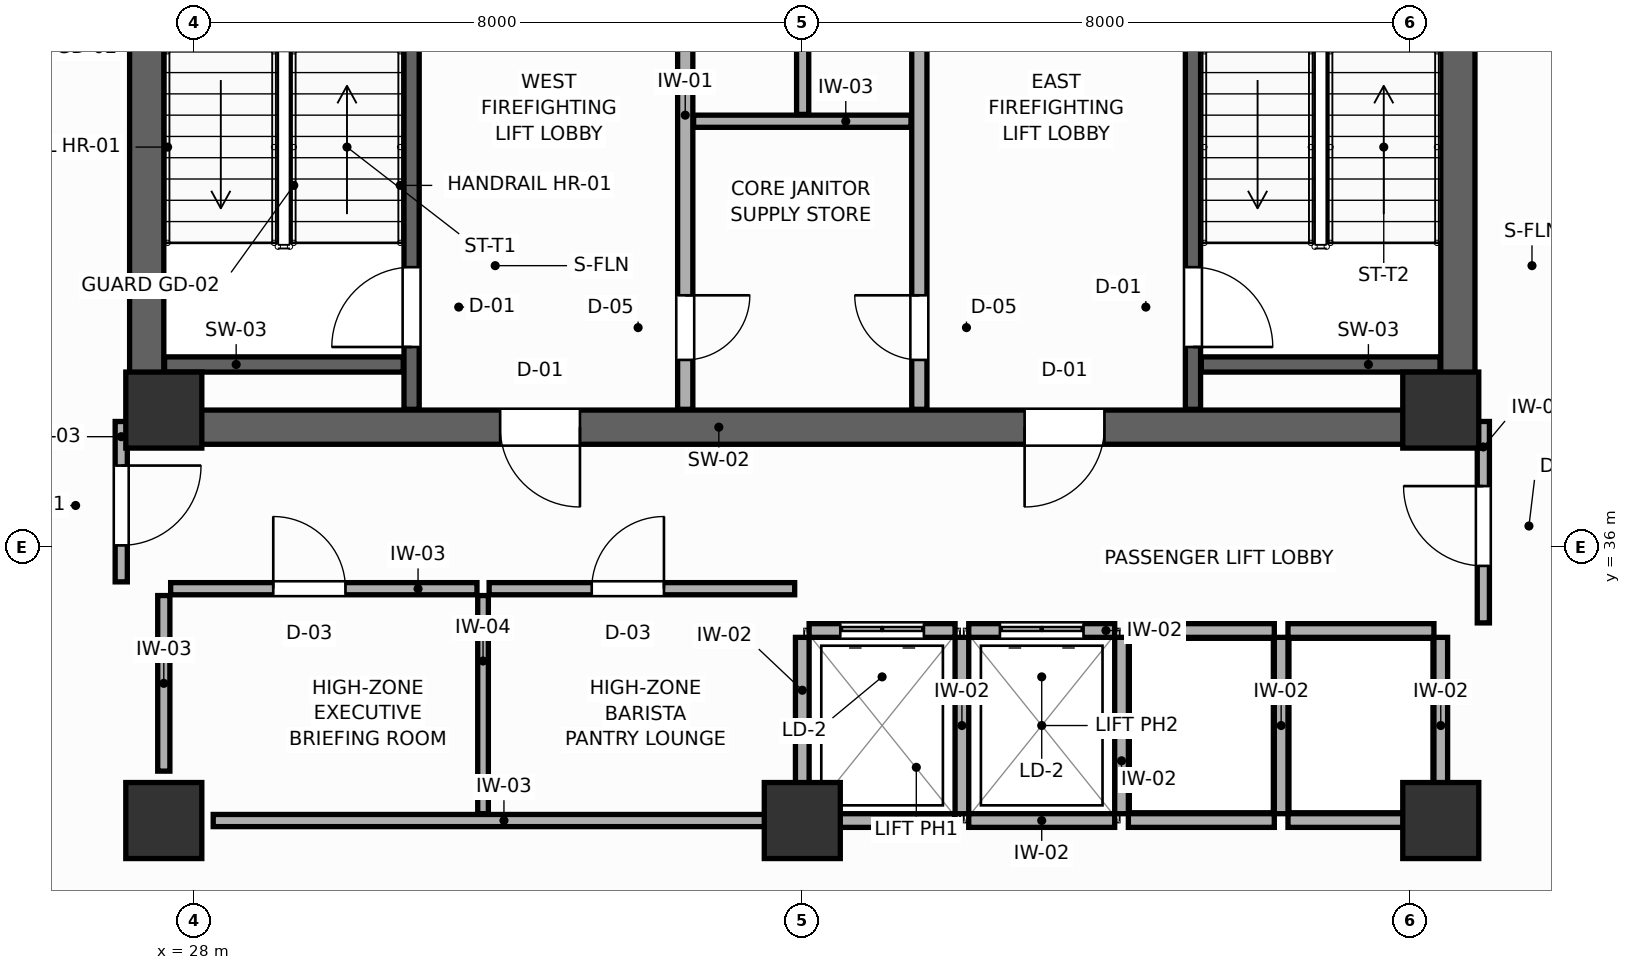
"""IFC4 building model, lengths in metres.
Left out: names, types, materials, properties, quantities, classifications, styles, units other than length and angle.
Written with IfcOpenShell. Run it as: python <this file> out.ifc"""

import sys

from ifc_helpers import new_model, si_unit, direction, frame, frame_2d, origin, origin_2d, place, context, subcontext, project, spatial, rectangle, extrude, source, transform, mapped, element, fill, save


model = new_model("IFC4")
c1 = context("Model", 3, precision=1e-05, world=origin(), true_north=direction((0.0, 1.0)))
c2 = subcontext(c1, "Body", "Model", "MODEL_VIEW")
j1 = project(units=[si_unit("LENGTHUNIT", "METRE"), si_unit("PLANEANGLEUNIT", "RADIAN")], contexts=[c1])
p1 = place(None, origin())
s1 = spatial("IfcSite", under=j1, at=p1, CompositionType="ELEMENT")
p2 = place(p1, origin())
s2 = spatial("IfcBuilding", under=s1, at=p2, CompositionType="ELEMENT")
p3 = place(p2, frame((0.0, 0.0, 193.8)))
s3 = spatial("IfcBuildingStorey", under=s2, at=p3, CompositionType="ELEMENT", Elevation=193.8)
p4 = place(p3, frame((27.15, 37.575, 0.0), z_axis=(0.0, 0.0, 1.0), x_axis=(1.0, 0.0, 0.0)))
e1 = element("IfcWall", 1, at=p4, inside=s3, PredefinedType="SHEAR", context=c2, shape_type="SweptSolid", body=[
    extrude(rectangle(XDim=17.7, YDim=0.45, at=frame_2d((8.85, 0.0))), origin(), (0.0, 0.0, 1.0), 3.6),
])
p5 = place(p4, frame((4.875, 0.0, 0.0)))
e2 = element("IfcOpeningElement", 2, at=p5, cuts=e1, PredefinedType="OPENING", context=c2, shape_type="SweptSolid", body=[
    extrude(rectangle(XDim=1.05, YDim=2.1, at=frame_2d((0.525, 1.05))), frame((0.0, 0.235, 0.0), z_axis=(0.0, -1.0, 0.0), x_axis=(1.0, 0.0, 0.0)), (0.0, 0.0, 1.0), 0.47),
])
p6 = place(p4, frame((11.775, 0.0, 0.0)))
e3 = element("IfcOpeningElement", 3, at=p6, cuts=e1, PredefinedType="OPENING", context=c2, shape_type="SweptSolid", body=[
    extrude(rectangle(XDim=1.05, YDim=2.1, at=frame_2d((0.525, 1.05))), frame((0.0, 0.235, 0.0), z_axis=(0.0, -1.0, 0.0), x_axis=(1.0, 0.0, 0.0)), (0.0, 0.0, 1.0), 0.47),
])
for number, where, z_axis, x_axis in (
    (4, (27.375, 37.8, 0.0), (0.0, 0.0, 1.0), (0.0, 1.0, 0.0)),
    (5, (44.625, 37.8, 0.0), (0.0, 0.0, 1.0), (0.0, 1.0, 0.0)),
):
    element("IfcWall", number, at=place(p3, frame(where, z_axis=z_axis, x_axis=x_axis)), inside=s3, PredefinedType="SHEAR", context=c2, shape_type="SweptSolid", body=[
        extrude(rectangle(XDim=9.0, YDim=0.45, at=frame_2d((4.5, 0.0))), origin(), (0.0, 0.0, 1.0), 3.6),
    ])
m1 = source(origin(), c2, "Body", "SweptSolid", [
    extrude(rectangle(XDim=1.0, YDim=1.0, at=origin_2d()), origin(), (0.0, 0.0, 1.0), 3.6),
])
for number, where, z_axis, x_axis in (
    (6, (27.6, 37.8, 0.0), (0.0, 0.0, 1.0), (1.0, 0.0, 0.0)),
    (7, (44.4, 37.8, 0.0), (0.0, 0.0, 1.0), (1.0, 0.0, 0.0)),
    (8, (27.6, 32.4, 0.0), (0.0, 0.0, 1.0), (1.0, 0.0, 0.0)),
    (9, (44.4, 32.4, 0.0), (0.0, 0.0, 1.0), (1.0, 0.0, 0.0)),
    (10, (36.0, 32.4, 0.0), (0.0, 0.0, 1.0), (1.0, 0.0, 0.0)),
):
    element("IfcColumn", number, at=place(p3, frame(where, z_axis=z_axis, x_axis=x_axis)), inside=s3, PredefinedType="COLUMN", context=c2, shape_type="MappedRepresentation", body=[
        mapped(m1, transform((0.0, 0.0, 0.0), scale=1.0)),
    ])
p7 = place(p3, frame((30.86, 37.81, 0.0), z_axis=(0.0, 0.0, 1.0), x_axis=(0.0, 1.0, 0.0)))
e11 = element("IfcWall", 11, at=p7, inside=s3, PredefinedType="SHEAR", context=c2, shape_type="SweptSolid", body=[
    extrude(rectangle(XDim=8.98, YDim=0.2, at=frame_2d((4.49, 0.0))), origin(), (0.0, 0.0, 1.0), 3.6),
])
p8 = place(p7, frame((0.82, 0.0, 0.0)))
e12 = element("IfcOpeningElement", 12, at=p8, cuts=e11, PredefinedType="OPENING", context=c2, shape_type="SweptSolid", body=[
    extrude(rectangle(XDim=1.05, YDim=2.1, at=frame_2d((0.525, 1.05))), frame((0.0, 0.11, 0.0), z_axis=(0.0, -1.0, 0.0), x_axis=(1.0, 0.0, 0.0)), (0.0, 0.0, 1.0), 0.22),
])
p9 = place(p3, frame((27.61, 38.4, 0.0), z_axis=(0.0, 0.0, 1.0), x_axis=(1.0, 0.0, 0.0)))
e13 = element("IfcWall", 13, at=p9, inside=s3, PredefinedType="SHEAR", context=c2, shape_type="SweptSolid", body=[
    extrude(rectangle(XDim=3.14, YDim=0.2, at=frame_2d((1.57, 0.0))), origin(), (0.0, 0.0, 1.0), 3.6),
])
p10 = place(p3, frame((41.14, 37.81, 0.0), z_axis=(0.0, 0.0, 1.0), x_axis=(0.0, 1.0, 0.0)))
e14 = element("IfcWall", 14, at=p10, inside=s3, PredefinedType="SHEAR", context=c2, shape_type="SweptSolid", body=[
    extrude(rectangle(XDim=8.98, YDim=0.2, at=frame_2d((4.49, 0.0))), origin(), (0.0, 0.0, 1.0), 3.6),
])
p11 = place(p10, frame((0.82, 0.0, 0.0)))
e15 = element("IfcOpeningElement", 15, at=p11, cuts=e14, PredefinedType="OPENING", context=c2, shape_type="SweptSolid", body=[
    extrude(rectangle(XDim=1.05, YDim=2.1, at=frame_2d((0.525, 1.05))), frame((0.0, 0.11, 0.0), z_axis=(0.0, -1.0, 0.0), x_axis=(1.0, 0.0, 0.0)), (0.0, 0.0, 1.0), 0.22),
])
p12 = place(p3, frame((41.25, 38.4, 0.0), z_axis=(0.0, 0.0, 1.0), x_axis=(1.0, 0.0, 0.0)))
e16 = element("IfcWall", 16, at=p12, inside=s3, PredefinedType="SHEAR", context=c2, shape_type="SweptSolid", body=[
    extrude(rectangle(XDim=3.14, YDim=0.2, at=frame_2d((1.57, 0.0))), origin(), (0.0, 0.0, 1.0), 3.6),
])
p13 = place(p3, frame((34.46, 37.81, 0.0), z_axis=(0.0, 0.0, 1.0), x_axis=(0.0, 1.0, 0.0)))
e17 = element("IfcWall", 17, at=p13, inside=s3, PredefinedType="PARTITIONING", context=c2, shape_type="SweptSolid", body=[
    extrude(rectangle(XDim=8.98, YDim=0.2, at=frame_2d((4.49, 0.0))), origin(), (0.0, 0.0, 1.0), 3.4),
])
p14 = place(p13, frame((0.65, 0.0, 0.0)))
e18 = element("IfcOpeningElement", 18, at=p14, cuts=e17, PredefinedType="OPENING", context=c2, shape_type="SweptSolid", body=[
    extrude(rectangle(XDim=0.85, YDim=2.05, at=frame_2d((0.425, 1.025))), frame((0.0, 0.11, 0.0), z_axis=(0.0, -1.0, 0.0), x_axis=(1.0, 0.0, 0.0)), (0.0, 0.0, 1.0), 0.22),
])
p15 = place(p3, frame((37.54, 37.81, 0.0), z_axis=(0.0, 0.0, 1.0), x_axis=(0.0, 1.0, 0.0)))
e19 = element("IfcWall", 19, at=p15, inside=s3, PredefinedType="PARTITIONING", context=c2, shape_type="SweptSolid", body=[
    extrude(rectangle(XDim=8.98, YDim=0.2, at=frame_2d((4.49, 0.0))), origin(), (0.0, 0.0, 1.0), 3.4),
])
p16 = place(p15, frame((0.65, 0.0, 0.0)))
e20 = element("IfcOpeningElement", 20, at=p16, cuts=e19, PredefinedType="OPENING", context=c2, shape_type="SweptSolid", body=[
    extrude(rectangle(XDim=0.85, YDim=2.05, at=frame_2d((0.425, 1.025))), frame((0.0, 0.11, 0.0), z_axis=(0.0, -1.0, 0.0), x_axis=(1.0, 0.0, 0.0)), (0.0, 0.0, 1.0), 0.22),
])
p17 = place(p3, frame((34.57, 41.6, 0.0), z_axis=(0.0, 0.0, 1.0), x_axis=(1.0, 0.0, 0.0)))
e21 = element("IfcWall", 21, at=p17, inside=s3, PredefinedType="PARTITIONING", context=c2, shape_type="SweptSolid", body=[
    extrude(rectangle(XDim=2.86, YDim=0.16, at=frame_2d((1.43, 0.0))), origin(), (0.0, 0.0, 1.0), 3.4),
])
p18 = place(p3, frame((36.005, 41.69, 0.0), z_axis=(0.0, 0.0, 1.0), x_axis=(0.0, 1.0, 0.0)))
e22 = element("IfcWall", 22, at=p18, inside=s3, PredefinedType="PARTITIONING", context=c2, shape_type="SweptSolid", body=[
    extrude(rectangle(XDim=5.1, YDim=0.16, at=frame_2d((2.55, 0.0))), origin(), (0.0, 0.0, 1.0), 3.4),
])
p19 = place(p3, frame((36.09, 34.9, 0.0), z_axis=(0.0, 0.0, 1.0), x_axis=(1.0, 0.0, 0.0)))
e23 = element("IfcWall", 23, at=p19, inside=s3, PredefinedType="PARTITIONING", context=c2, shape_type="SweptSolid", body=[
    extrude(rectangle(XDim=1.92, YDim=0.18, at=frame_2d((0.96, 0.0))), origin(), (0.0, 0.0, 1.0), 3.4),
])
p20 = place(p19, frame((0.41, 0.0, 0.0)))
e24 = element("IfcOpeningElement", 24, at=p20, cuts=e23, PredefinedType="OPENING", context=c2, shape_type="SweptSolid", body=[
    extrude(rectangle(XDim=1.1, YDim=2.1, at=frame_2d((0.55, 1.05))), frame((0.0, 0.1, 0.0), z_axis=(0.0, -1.0, 0.0), x_axis=(1.0, 0.0, 0.0)), (0.0, 0.0, 1.0), 0.2),
])
p21 = place(p3, frame((36.09, 32.4, 0.0), z_axis=(0.0, 0.0, 1.0), x_axis=(1.0, 0.0, 0.0)))
e25 = element("IfcWall", 25, at=p21, inside=s3, PredefinedType="PARTITIONING", context=c2, shape_type="SweptSolid", body=[
    extrude(rectangle(XDim=1.92, YDim=0.18, at=frame_2d((0.96, 0.0))), origin(), (0.0, 0.0, 1.0), 2.95),
])
p22 = place(p3, frame((36.0, 32.49, 0.0), z_axis=(0.0, 0.0, 1.0), x_axis=(0.0, 1.0, 0.0)))
e26 = element("IfcWall", 26, at=p22, inside=s3, PredefinedType="PARTITIONING", context=c2, shape_type="SweptSolid", body=[
    extrude(rectangle(XDim=2.32, YDim=0.18, at=frame_2d((1.16, 0.0))), origin(), (0.0, 0.0, 1.0), 3.4),
])
p23 = place(p3, frame((38.19, 34.9, 0.0), z_axis=(0.0, 0.0, 1.0), x_axis=(1.0, 0.0, 0.0)))
e27 = element("IfcWall", 27, at=p23, inside=s3, PredefinedType="PARTITIONING", context=c2, shape_type="SweptSolid", body=[
    extrude(rectangle(XDim=1.92, YDim=0.18, at=frame_2d((0.96, 0.0))), origin(), (0.0, 0.0, 1.0), 3.4),
])
p24 = place(p23, frame((0.41, 0.0, 0.0)))
e28 = element("IfcOpeningElement", 28, at=p24, cuts=e27, PredefinedType="OPENING", context=c2, shape_type="SweptSolid", body=[
    extrude(rectangle(XDim=1.1, YDim=2.1, at=frame_2d((0.55, 1.05))), frame((0.0, 0.1, 0.0), z_axis=(0.0, -1.0, 0.0), x_axis=(1.0, 0.0, 0.0)), (0.0, 0.0, 1.0), 0.2),
])
p25 = place(p3, frame((38.19, 32.4, 0.0), z_axis=(0.0, 0.0, 1.0), x_axis=(1.0, 0.0, 0.0)))
e29 = element("IfcWall", 29, at=p25, inside=s3, PredefinedType="PARTITIONING", context=c2, shape_type="SweptSolid", body=[
    extrude(rectangle(XDim=1.92, YDim=0.18, at=frame_2d((0.96, 0.0))), origin(), (0.0, 0.0, 1.0), 2.95),
])
p26 = place(p3, frame((38.1, 32.49, 0.0), z_axis=(0.0, 0.0, 1.0), x_axis=(0.0, 1.0, 0.0)))
e30 = element("IfcWall", 30, at=p26, inside=s3, PredefinedType="PARTITIONING", context=c2, shape_type="SweptSolid", body=[
    extrude(rectangle(XDim=2.32, YDim=0.18, at=frame_2d((1.16, 0.0))), origin(), (0.0, 0.0, 1.0), 3.4),
])
p27 = place(p3, frame((40.29, 34.9, 0.0), z_axis=(0.0, 0.0, 1.0), x_axis=(1.0, 0.0, 0.0)))
e31 = element("IfcWall", 31, at=p27, inside=s3, PredefinedType="PARTITIONING", context=c2, shape_type="SweptSolid", body=[
    extrude(rectangle(XDim=1.92, YDim=0.18, at=frame_2d((0.96, 0.0))), origin(), (0.0, 0.0, 1.0), 3.4),
])
p28 = place(p3, frame((40.29, 32.4, 0.0), z_axis=(0.0, 0.0, 1.0), x_axis=(1.0, 0.0, 0.0)))
e32 = element("IfcWall", 32, at=p28, inside=s3, PredefinedType="PARTITIONING", context=c2, shape_type="SweptSolid", body=[
    extrude(rectangle(XDim=1.92, YDim=0.18, at=frame_2d((0.96, 0.0))), origin(), (0.0, 0.0, 1.0), 2.95),
])
p29 = place(p3, frame((40.2, 32.49, 0.0), z_axis=(0.0, 0.0, 1.0), x_axis=(0.0, 1.0, 0.0)))
e33 = element("IfcWall", 33, at=p29, inside=s3, PredefinedType="PARTITIONING", context=c2, shape_type="SweptSolid", body=[
    extrude(rectangle(XDim=2.32, YDim=0.18, at=frame_2d((1.16, 0.0))), origin(), (0.0, 0.0, 1.0), 3.4),
])
p30 = place(p3, frame((42.39, 34.9, 0.0), z_axis=(0.0, 0.0, 1.0), x_axis=(1.0, 0.0, 0.0)))
e34 = element("IfcWall", 34, at=p30, inside=s3, PredefinedType="PARTITIONING", context=c2, shape_type="SweptSolid", body=[
    extrude(rectangle(XDim=1.92, YDim=0.18, at=frame_2d((0.96, 0.0))), origin(), (0.0, 0.0, 1.0), 3.4),
])
p31 = place(p3, frame((42.39, 32.4, 0.0), z_axis=(0.0, 0.0, 1.0), x_axis=(1.0, 0.0, 0.0)))
e35 = element("IfcWall", 35, at=p31, inside=s3, PredefinedType="PARTITIONING", context=c2, shape_type="SweptSolid", body=[
    extrude(rectangle(XDim=1.92, YDim=0.18, at=frame_2d((0.96, 0.0))), origin(), (0.0, 0.0, 1.0), 2.95),
])
for number, where, z_axis, x_axis in (
    (36, (42.3, 32.49, 0.0), (0.0, 0.0, 1.0), (0.0, 1.0, 0.0)),
    (37, (44.4, 32.49, 0.0), (0.0, 0.0, 1.0), (0.0, 1.0, 0.0)),
):
    element("IfcWall", number, at=place(p3, frame(where, z_axis=z_axis, x_axis=x_axis)), inside=s3, PredefinedType="PARTITIONING", context=c2, shape_type="SweptSolid", body=[
        extrude(rectangle(XDim=2.32, YDim=0.18, at=frame_2d((1.16, 0.0))), origin(), (0.0, 0.0, 1.0), 3.4),
    ])
p32 = place(p3, frame((28.25, 32.4, 0.0), z_axis=(0.0, 0.0, 1.0), x_axis=(1.0, 0.0, 0.0)))
e38 = element("IfcWall", 38, at=p32, inside=s3, PredefinedType="PARTITIONING", context=c2, shape_type="SweptSolid", body=[
    extrude(rectangle(XDim=7.65, YDim=0.16, at=frame_2d((3.825, 0.0))), origin(), (0.0, 0.0, 1.0), 2.95),
])
p33 = place(p3, frame((27.6, 33.05, 0.0), z_axis=(0.0, 0.0, 1.0), x_axis=(0.0, 1.0, 0.0)))
e39 = element("IfcWall", 39, at=p33, inside=s3, PredefinedType="PARTITIONING", context=c2, shape_type="SweptSolid", body=[
    extrude(rectangle(XDim=2.31, YDim=0.16, at=frame_2d((1.155, 0.0))), origin(), (0.0, 0.0, 1.0), 3.4),
])
p34 = place(p3, frame((31.8, 32.49, 0.0), z_axis=(0.0, 0.0, 1.0), x_axis=(0.0, 1.0, 0.0)))
e40 = element("IfcWall", 40, at=p34, inside=s3, PredefinedType="PARTITIONING", context=c2, shape_type="SweptSolid", body=[
    extrude(rectangle(XDim=2.87, YDim=0.14, at=frame_2d((1.435, 0.0))), origin(), (0.0, 0.0, 1.0), 3.4),
])
p35 = place(p3, frame((27.69, 35.45, 0.0), z_axis=(0.0, 0.0, 1.0), x_axis=(1.0, 0.0, 0.0)))
e41 = element("IfcWall", 41, at=p35, inside=s3, PredefinedType="PARTITIONING", context=c2, shape_type="SweptSolid", body=[
    extrude(rectangle(XDim=4.03, YDim=0.16, at=frame_2d((2.015, 0.0))), origin(), (0.0, 0.0, 1.0), 3.4),
])
p36 = place(p35, frame((1.35, 0.0, 0.0)))
e42 = element("IfcOpeningElement", 42, at=p36, cuts=e41, PredefinedType="OPENING", context=c2, shape_type="SweptSolid", body=[
    extrude(rectangle(XDim=0.95, YDim=2.05, at=frame_2d((0.475, 1.025))), frame((0.0, 0.09, 0.0), z_axis=(0.0, -1.0, 0.0), x_axis=(1.0, 0.0, 0.0)), (0.0, 0.0, 1.0), 0.18),
])
p37 = place(p3, frame((31.88, 35.45, 0.0), z_axis=(0.0, 0.0, 1.0), x_axis=(1.0, 0.0, 0.0)))
e43 = element("IfcWall", 43, at=p37, inside=s3, PredefinedType="PARTITIONING", context=c2, shape_type="SweptSolid", body=[
    extrude(rectangle(XDim=4.02, YDim=0.16, at=frame_2d((2.01, 0.0))), origin(), (0.0, 0.0, 1.0), 3.4),
])
p38 = place(p37, frame((1.35, 0.0, 0.0)))
e44 = element("IfcOpeningElement", 44, at=p38, cuts=e43, PredefinedType="OPENING", context=c2, shape_type="SweptSolid", body=[
    extrude(rectangle(XDim=0.95, YDim=2.05, at=frame_2d((0.475, 1.025))), frame((0.0, 0.09, 0.0), z_axis=(0.0, -1.0, 0.0), x_axis=(1.0, 0.0, 0.0)), (0.0, 0.0, 1.0), 0.18),
])
p39 = place(p3, frame((27.04, 35.54, 0.0), z_axis=(0.0, 0.0, 1.0), x_axis=(0.0, 1.0, 0.0)))
e45 = element("IfcWall", 45, at=p39, inside=s3, PredefinedType="PARTITIONING", context=c2, shape_type="SweptSolid", body=[
    extrude(rectangle(XDim=2.11, YDim=0.16, at=frame_2d((1.055, 0.0))), origin(), (0.0, 0.0, 1.0), 3.4),
])
p40 = place(p39, frame((0.48, 0.0, 0.0)))
e46 = element("IfcOpeningElement", 46, at=p40, cuts=e45, PredefinedType="OPENING", context=c2, shape_type="SweptSolid", body=[
    extrude(rectangle(XDim=1.05, YDim=2.1, at=frame_2d((0.525, 1.05))), frame((0.0, 0.09, 0.0), z_axis=(0.0, -1.0, 0.0), x_axis=(1.0, 0.0, 0.0)), (0.0, 0.0, 1.0), 0.18),
])
p41 = place(p3, frame((44.96, 35.0, 0.0), z_axis=(0.0, 0.0, 1.0), x_axis=(0.0, 1.0, 0.0)))
e47 = element("IfcWall", 47, at=p41, inside=s3, PredefinedType="PARTITIONING", context=c2, shape_type="SweptSolid", body=[
    extrude(rectangle(XDim=2.65, YDim=0.16, at=frame_2d((1.325, 0.0))), origin(), (0.0, 0.0, 1.0), 3.4),
])
p42 = place(p41, frame((0.75, 0.0, 0.0)))
e48 = element("IfcOpeningElement", 48, at=p42, cuts=e47, PredefinedType="OPENING", context=c2, shape_type="SweptSolid", body=[
    extrude(rectangle(XDim=1.05, YDim=2.1, at=frame_2d((0.525, 1.05))), frame((0.0, 0.09, 0.0), z_axis=(0.0, -1.0, 0.0), x_axis=(1.0, 0.0, 0.0)), (0.0, 0.0, 1.0), 0.18),
])
p43 = place(p8, origin())
e49 = element("IfcDoor", 49, at=p43, inside=s3, OperationType="SINGLE_SWING_LEFT", PredefinedType="DOOR", context=c2, shape_type="SweptSolid", body=[
    extrude(rectangle(XDim=1.05, YDim=2.1, at=frame_2d((0.525, 1.05))), frame((0.0, 0.025, 0.0), z_axis=(0.0, -1.0, 0.0), x_axis=(1.0, 0.0, 0.0)), (0.0, 0.0, 1.0), 0.05),
])
fill(e12, e49)
p44 = place(p11, frame((1.05, 0.0, 0.0), z_axis=(0.0, 0.0, 1.0), x_axis=(-1.0, 0.0, 0.0)))
e50 = element("IfcDoor", 50, at=p44, inside=s3, OperationType="SINGLE_SWING_RIGHT", PredefinedType="DOOR", context=c2, shape_type="SweptSolid", body=[
    extrude(rectangle(XDim=1.05, YDim=2.1, at=frame_2d((0.525, 1.05))), frame((0.0, 0.025, 0.0), z_axis=(0.0, -1.0, 0.0), x_axis=(1.0, 0.0, 0.0)), (0.0, 0.0, 1.0), 0.05),
])
fill(e15, e50)
p45 = place(p14, frame((0.85, 0.0, 0.0), z_axis=(0.0, 0.0, 1.0), x_axis=(-1.0, 0.0, 0.0)))
e51 = element("IfcDoor", 51, at=p45, inside=s3, OperationType="SINGLE_SWING_LEFT", PredefinedType="DOOR", context=c2, shape_type="SweptSolid", body=[
    extrude(rectangle(XDim=0.85, YDim=2.05, at=frame_2d((0.425, 1.025))), frame((0.0, 0.025, 0.0), z_axis=(0.0, -1.0, 0.0), x_axis=(1.0, 0.0, 0.0)), (0.0, 0.0, 1.0), 0.05),
])
fill(e18, e51)
p46 = place(p16, origin())
e52 = element("IfcDoor", 52, at=p46, inside=s3, OperationType="SINGLE_SWING_RIGHT", PredefinedType="DOOR", context=c2, shape_type="SweptSolid", body=[
    extrude(rectangle(XDim=0.85, YDim=2.05, at=frame_2d((0.425, 1.025))), frame((0.0, 0.025, 0.0), z_axis=(0.0, -1.0, 0.0), x_axis=(1.0, 0.0, 0.0)), (0.0, 0.0, 1.0), 0.05),
])
fill(e20, e52)
p47 = place(p20, origin())
e53 = element("IfcDoor", 53, at=p47, inside=s3, OperationType="DOUBLE_DOOR_SLIDING", PredefinedType="DOOR", context=c2, shape_type="SweptSolid", body=[
    extrude(rectangle(XDim=1.1, YDim=2.1, at=frame_2d((0.55, 1.05))), frame((0.0, 0.025, 0.0), z_axis=(0.0, -1.0, 0.0), x_axis=(1.0, 0.0, 0.0)), (0.0, 0.0, 1.0), 0.05),
])
fill(e24, e53)
p48 = place(p24, origin())
e54 = element("IfcDoor", 54, at=p48, inside=s3, OperationType="DOUBLE_DOOR_SLIDING", PredefinedType="DOOR", context=c2, shape_type="SweptSolid", body=[
    extrude(rectangle(XDim=1.1, YDim=2.1, at=frame_2d((0.55, 1.05))), frame((0.0, 0.025, 0.0), z_axis=(0.0, -1.0, 0.0), x_axis=(1.0, 0.0, 0.0)), (0.0, 0.0, 1.0), 0.05),
])
fill(e28, e54)
p49 = place(p36, origin())
e55 = element("IfcDoor", 55, at=p49, inside=s3, OperationType="SINGLE_SWING_LEFT", PredefinedType="DOOR", context=c2, shape_type="SweptSolid", body=[
    extrude(rectangle(XDim=0.95, YDim=2.05, at=frame_2d((0.475, 1.025))), frame((0.0, 0.025, 0.0), z_axis=(0.0, -1.0, 0.0), x_axis=(1.0, 0.0, 0.0)), (0.0, 0.0, 1.0), 0.05),
])
fill(e42, e55)
p50 = place(p38, origin())
e56 = element("IfcDoor", 56, at=p50, inside=s3, OperationType="SINGLE_SWING_RIGHT", PredefinedType="DOOR", context=c2, shape_type="SweptSolid", body=[
    extrude(rectangle(XDim=0.95, YDim=2.05, at=frame_2d((0.475, 1.025))), frame((0.0, 0.025, 0.0), z_axis=(0.0, -1.0, 0.0), x_axis=(1.0, 0.0, 0.0)), (0.0, 0.0, 1.0), 0.05),
])
fill(e44, e56)
p51 = place(p40, frame((1.05, 0.0, 0.0), z_axis=(0.0, 0.0, 1.0), x_axis=(-1.0, 0.0, 0.0)))
e57 = element("IfcDoor", 57, at=p51, inside=s3, OperationType="SINGLE_SWING_LEFT", PredefinedType="DOOR", context=c2, shape_type="SweptSolid", body=[
    extrude(rectangle(XDim=1.05, YDim=2.1, at=frame_2d((0.525, 1.05))), frame((0.0, 0.025, 0.0), z_axis=(0.0, -1.0, 0.0), x_axis=(1.0, 0.0, 0.0)), (0.0, 0.0, 1.0), 0.05),
])
fill(e46, e57)
p52 = place(p42, origin())
e58 = element("IfcDoor", 58, at=p52, inside=s3, OperationType="SINGLE_SWING_RIGHT", PredefinedType="DOOR", context=c2, shape_type="SweptSolid", body=[
    extrude(rectangle(XDim=1.05, YDim=2.1, at=frame_2d((0.525, 1.05))), frame((0.0, 0.025, 0.0), z_axis=(0.0, -1.0, 0.0), x_axis=(1.0, 0.0, 0.0)), (0.0, 0.0, 1.0), 0.05),
])
fill(e48, e58)
p53 = place(p5, frame((1.05, 0.0, 0.0), z_axis=(0.0, 0.0, 1.0), x_axis=(-1.0, 0.0, 0.0)))
e59 = element("IfcDoor", 59, at=p53, inside=s3, OperationType="SINGLE_SWING_LEFT", PredefinedType="DOOR", context=c2, shape_type="SweptSolid", body=[
    extrude(rectangle(XDim=1.05, YDim=2.1, at=frame_2d((0.525, 1.05))), frame((0.0, 0.025, 0.0), z_axis=(0.0, -1.0, 0.0), x_axis=(1.0, 0.0, 0.0)), (0.0, 0.0, 1.0), 0.05),
])
fill(e2, e59)
p54 = place(p6, frame((1.05, 0.0, 0.0), z_axis=(0.0, 0.0, 1.0), x_axis=(-1.0, 0.0, 0.0)))
e60 = element("IfcDoor", 60, at=p54, inside=s3, OperationType="SINGLE_SWING_RIGHT", PredefinedType="DOOR", context=c2, shape_type="SweptSolid", body=[
    extrude(rectangle(XDim=1.05, YDim=2.1, at=frame_2d((0.525, 1.05))), frame((0.0, 0.025, 0.0), z_axis=(0.0, -1.0, 0.0), x_axis=(1.0, 0.0, 0.0)), (0.0, 0.0, 1.0), 0.05),
])
fill(e3, e60)
save(model, sys.argv[1])
